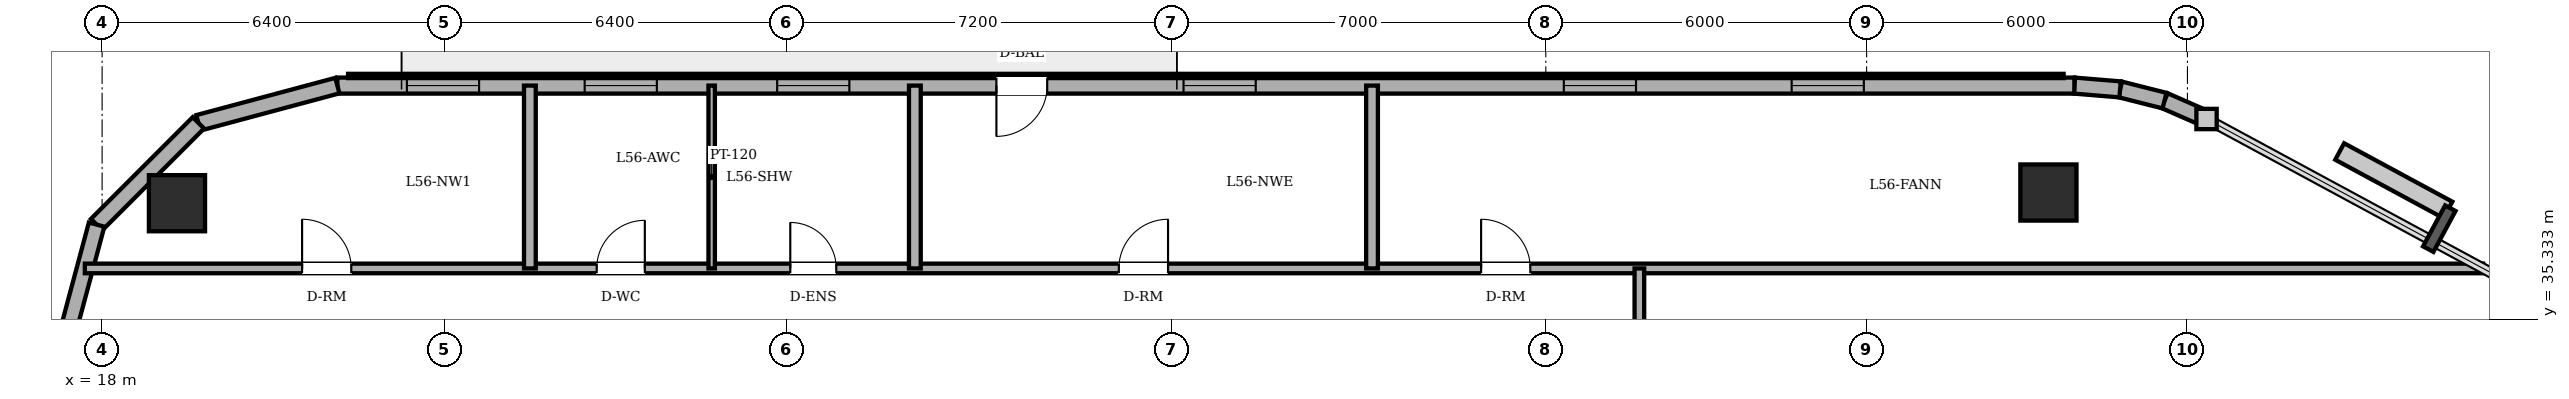
"""IFC4 building model, lengths in metres.
Left out: names, types, materials, properties, quantities, classifications, styles, units other than length and angle.
Written with IfcOpenShell. Run it as: python <this file> out.ifc"""

import sys

from ifc_helpers import new_model, si_unit, direction, frame, frame_2d, origin, origin_2d, place, context, subcontext, project, spatial, rectangle, circle, extrude, element, fill, save


model = new_model("IFC4")
c1 = context("Model", 3, precision=1e-05, world=origin(), true_north=direction((0.0, 1.0)))
c2 = subcontext(c1, "Body", "Model", "MODEL_VIEW")
j1 = project(units=[si_unit("LENGTHUNIT", "METRE"), si_unit("PLANEANGLEUNIT", "RADIAN")], contexts=[c1])
p1 = place(None, origin())
s1 = spatial("IfcSite", under=j1, at=p1, CompositionType="ELEMENT")
p2 = place(p1, origin())
s2 = spatial("IfcBuilding", under=s1, at=p2, CompositionType="ELEMENT")
p3 = place(p2, frame((0.0, 0.0, 215.7)))
s3 = spatial("IfcBuildingStorey", under=s2, at=p3, CompositionType="ELEMENT", Elevation=215.7)
for number, where, z_axis, x_axis in (
    (1, (54.4, 37.7, 0.0), (0.0, 0.0, 1.0), (1.0, 0.0, 0.0)),
    (2, (19.4, 37.5, 0.0), (0.0, 0.0, 1.0), (1.0, 0.0, 0.0)),
):
    element("IfcColumn", number, at=place(p3, frame(where, z_axis=z_axis, x_axis=x_axis)), inside=s3, PredefinedType="COLUMN", context=c2, shape_type="SweptSolid", body=[
        extrude(circle(Radius=0.525, at=origin_2d()), origin(), (0.0, 0.0, 1.0), 3.6),
    ])
p4 = place(p3, frame((57.357, 39.075, 0.0), z_axis=(0.0, 0.0, 1.0), x_axis=(-0.916085473636, 0.400983048261, 0.0)))
e3 = element("IfcWall", 3, at=p4, inside=s3, PredefinedType="SOLIDWALL", context=c2, shape_type="SweptSolid", body=[
    extrude(rectangle(XDim=0.858, YDim=0.3, at=frame_2d((0.429, 0.0))), origin(), (0.0, 0.0, 1.0), 3.4),
])
p5 = place(p3, frame((56.571, 39.419, 0.0), z_axis=(0.0, 0.0, 1.0), x_axis=(-0.969536346338, 0.244947490555, 0.0)))
e4 = element("IfcWall", 4, at=p5, inside=s3, PredefinedType="SOLIDWALL", context=c2, shape_type="SweptSolid", body=[
    extrude(rectangle(XDim=0.857, YDim=0.3, at=frame_2d((0.429, 0.0))), origin(), (0.0, 0.0, 1.0), 3.4),
])
p6 = place(p3, frame((55.74, 39.629, 0.0), z_axis=(0.0, 0.0, 1.0), x_axis=(-0.996565355958, 0.082809971041, 0.0)))
e5 = element("IfcWall", 5, at=p6, inside=s3, PredefinedType="SOLIDWALL", context=c2, shape_type="SweptSolid", body=[
    extrude(rectangle(XDim=0.858, YDim=0.3, at=frame_2d((0.429, 0.0))), origin(), (0.0, 0.0, 1.0), 3.4),
])
p7 = place(p3, frame((54.885, 39.7, 0.0), z_axis=(0.0, 0.0, 1.0), x_axis=(-1.0, 0.0, 0.0)))
e6 = element("IfcWall", 6, at=p7, inside=s3, PredefinedType="SOLIDWALL", context=c2, shape_type="SweptSolid", body=[
    extrude(rectangle(XDim=32.485, YDim=0.3, at=frame_2d((16.243, 0.0))), origin(), (0.0, 0.0, 1.0), 3.4),
])
p8 = place(p7, frame((19.21, 0.0, 0.0)))
e7 = element("IfcOpeningElement", 7, at=p8, cuts=e6, PredefinedType="OPENING", context=c2, shape_type="SweptSolid", body=[
    extrude(rectangle(XDim=0.95, YDim=2.2, at=frame_2d((0.475, 1.1))), frame((0.0, 0.16, 0.0), z_axis=(0.0, -1.0, 0.0), x_axis=(1.0, 0.0, 0.0)), (0.0, 0.0, 1.0), 0.32),
])
p9 = place(p7, frame((3.937, 0.0, 0.85)))
e8 = element("IfcOpeningElement", 8, at=p9, cuts=e6, PredefinedType="OPENING", context=c2, shape_type="SweptSolid", body=[
    extrude(rectangle(XDim=1.35, YDim=1.55, at=frame_2d((0.675, 0.775))), frame((0.0, 0.16, 0.0), z_axis=(0.0, -1.0, 0.0), x_axis=(1.0, 0.0, 0.0)), (0.0, 0.0, 1.0), 0.32),
])
p10 = place(p7, frame((8.198, 0.0, 0.85)))
e9 = element("IfcOpeningElement", 9, at=p10, cuts=e6, PredefinedType="OPENING", context=c2, shape_type="SweptSolid", body=[
    extrude(rectangle(XDim=1.35, YDim=1.55, at=frame_2d((0.675, 0.775))), frame((0.0, 0.16, 0.0), z_axis=(0.0, -1.0, 0.0), x_axis=(1.0, 0.0, 0.0)), (0.0, 0.0, 1.0), 0.32),
])
p11 = place(p7, frame((15.31, 0.0, 0.85)))
e10 = element("IfcOpeningElement", 10, at=p11, cuts=e6, PredefinedType="OPENING", context=c2, shape_type="SweptSolid", body=[
    extrude(rectangle(XDim=1.35, YDim=1.55, at=frame_2d((0.675, 0.775))), frame((0.0, 0.16, 0.0), z_axis=(0.0, -1.0, 0.0), x_axis=(1.0, 0.0, 0.0)), (0.0, 0.0, 1.0), 0.32),
])
p12 = place(p7, frame((22.91, 0.0, 0.85)))
e11 = element("IfcOpeningElement", 11, at=p12, cuts=e6, PredefinedType="OPENING", context=c2, shape_type="SweptSolid", body=[
    extrude(rectangle(XDim=1.35, YDim=1.55, at=frame_2d((0.675, 0.775))), frame((0.0, 0.16, 0.0), z_axis=(0.0, -1.0, 0.0), x_axis=(1.0, 0.0, 0.0)), (0.0, 0.0, 1.0), 0.32),
])
p13 = place(p7, frame((26.51, 0.0, 0.85)))
e12 = element("IfcOpeningElement", 12, at=p13, cuts=e6, PredefinedType="OPENING", context=c2, shape_type="SweptSolid", body=[
    extrude(rectangle(XDim=1.35, YDim=1.55, at=frame_2d((0.675, 0.775))), frame((0.0, 0.16, 0.0), z_axis=(0.0, -1.0, 0.0), x_axis=(1.0, 0.0, 0.0)), (0.0, 0.0, 1.0), 0.32),
])
p14 = place(p7, frame((29.835, 0.0, 0.85)))
e13 = element("IfcOpeningElement", 13, at=p14, cuts=e6, PredefinedType="OPENING", context=c2, shape_type="SweptSolid", body=[
    extrude(rectangle(XDim=1.35, YDim=1.55, at=frame_2d((0.675, 0.775))), frame((0.0, 0.16, 0.0), z_axis=(0.0, -1.0, 0.0), x_axis=(1.0, 0.0, 0.0)), (0.0, 0.0, 1.0), 0.32),
])
p15 = place(p3, frame((22.4, 39.7, 0.0), z_axis=(0.0, 0.0, 1.0), x_axis=(-0.965889330541, -0.258955210695, 0.0)))
e14 = element("IfcWall", 14, at=p15, inside=s3, PredefinedType="SOLIDWALL", context=c2, shape_type="SweptSolid", body=[
    extrude(rectangle(XDim=2.692, YDim=0.3, at=frame_2d((1.346, 0.0))), origin(), (0.0, 0.0, 1.0), 3.4),
])
p16 = place(p3, frame((19.8, 39.003, 0.0), z_axis=(0.0, 0.0, 1.0), x_axis=(-0.707152139074, -0.70706142039, 0.0)))
e15 = element("IfcWall", 15, at=p16, inside=s3, PredefinedType="SOLIDWALL", context=c2, shape_type="SweptSolid", body=[
    extrude(rectangle(XDim=2.691, YDim=0.3, at=frame_2d((1.346, 0.0))), origin(), (0.0, 0.0, 1.0), 3.4),
])
p17 = place(p3, frame((17.897, 37.1, 0.0), z_axis=(0.0, 0.0, 1.0), x_axis=(-0.258932525951, -0.965895412042, 0.0)))
e16 = element("IfcWall", 16, at=p17, inside=s3, PredefinedType="SOLIDWALL", context=c2, shape_type="SweptSolid", body=[
    extrude(rectangle(XDim=2.692, YDim=0.3, at=frame_2d((1.346, 0.0))), origin(), (0.0, 0.0, 1.0), 3.4),
])
p18 = place(p3, frame((17.677, 36.28, 0.0), z_axis=(0.0, 0.0, 1.0), x_axis=(1.0, 0.0, 0.0)))
e17 = element("IfcWall", 17, at=p18, inside=s3, PredefinedType="PARTITIONING", context=c2, shape_type="SweptSolid", body=[
    extrude(rectangle(XDim=44.853, YDim=0.18, at=frame_2d((22.427, 0.0))), origin(), (0.0, 0.0, 1.0), 3.4),
])
p19 = place(p18, frame((9.573, 0.0, 0.0)))
e18 = element("IfcOpeningElement", 18, at=p19, cuts=e17, PredefinedType="OPENING", context=c2, shape_type="SweptSolid", body=[
    extrude(rectangle(XDim=0.9, YDim=2.1, at=frame_2d((0.45, 1.05))), frame((0.0, 0.1, 0.0), z_axis=(0.0, -1.0, 0.0), x_axis=(1.0, 0.0, 0.0)), (0.0, 0.0, 1.0), 0.2),
])
p20 = place(p18, frame((13.193, 0.0, 0.0)))
e19 = element("IfcOpeningElement", 19, at=p20, cuts=e17, PredefinedType="OPENING", context=c2, shape_type="SweptSolid", body=[
    extrude(rectangle(XDim=0.86, YDim=2.1, at=frame_2d((0.43, 1.05))), frame((0.0, 0.1, 0.0), z_axis=(0.0, -1.0, 0.0), x_axis=(1.0, 0.0, 0.0)), (0.0, 0.0, 1.0), 0.2),
])
p21 = place(p18, frame((26.113, 0.0, 0.0)))
e20 = element("IfcOpeningElement", 20, at=p21, cuts=e17, PredefinedType="OPENING", context=c2, shape_type="SweptSolid", body=[
    extrude(rectangle(XDim=0.92, YDim=2.1, at=frame_2d((0.46, 1.05))), frame((0.0, 0.1, 0.0), z_axis=(0.0, -1.0, 0.0), x_axis=(1.0, 0.0, 0.0)), (0.0, 0.0, 1.0), 0.2),
])
p22 = place(p18, frame((4.063, 0.0, 0.0)))
e21 = element("IfcOpeningElement", 21, at=p22, cuts=e17, PredefinedType="OPENING", context=c2, shape_type="SweptSolid", body=[
    extrude(rectangle(XDim=0.92, YDim=2.1, at=frame_2d((0.46, 1.05))), frame((0.0, 0.1, 0.0), z_axis=(0.0, -1.0, 0.0), x_axis=(1.0, 0.0, 0.0)), (0.0, 0.0, 1.0), 0.2),
])
p23 = place(p18, frame((19.338, 0.0, 0.0)))
e22 = element("IfcOpeningElement", 22, at=p23, cuts=e17, PredefinedType="OPENING", context=c2, shape_type="SweptSolid", body=[
    extrude(rectangle(XDim=0.92, YDim=2.1, at=frame_2d((0.46, 1.05))), frame((0.0, 0.1, 0.0), z_axis=(0.0, -1.0, 0.0), x_axis=(1.0, 0.0, 0.0)), (0.0, 0.0, 1.0), 0.2),
])
p24 = place(p3, frame((26.0, 36.28, 0.0), z_axis=(0.0, 0.0, 1.0), x_axis=(0.0, 1.0, 0.0)))
e23 = element("IfcWall", 23, at=p24, inside=s3, PredefinedType="PARTITIONING", context=c2, shape_type="SweptSolid", body=[
    extrude(rectangle(XDim=3.42, YDim=0.22, at=frame_2d((1.71, 0.0))), origin(), (0.0, 0.0, 1.0), 3.4),
])
p25 = place(p3, frame((29.4, 36.28, 0.0), z_axis=(0.0, 0.0, 1.0), x_axis=(0.0, 1.0, 0.0)))
e24 = element("IfcWall", 24, at=p25, inside=s3, PredefinedType="PARTITIONING", context=c2, shape_type="SweptSolid", body=[
    extrude(rectangle(XDim=3.42, YDim=0.12, at=frame_2d((1.71, 0.0))), origin(), (0.0, 0.0, 1.0), 3.4),
])
for number, where, z_axis, x_axis in (
    (25, (33.2, 36.28, 0.0), (0.0, 0.0, 1.0), (0.0, 1.0, 0.0)),
    (26, (41.75, 36.28, 0.0), (0.0, 0.0, 1.0), (0.0, 1.0, 0.0)),
):
    element("IfcWall", number, at=place(p3, frame(where, z_axis=z_axis, x_axis=x_axis)), inside=s3, PredefinedType="PARTITIONING", context=c2, shape_type="SweptSolid", body=[
        extrude(rectangle(XDim=3.42, YDim=0.22, at=frame_2d((1.71, 0.0))), origin(), (0.0, 0.0, 1.0), 3.4),
    ])
p26 = place(p3, frame((46.75, 33.82, 0.0), z_axis=(0.0, 0.0, 1.0), x_axis=(0.0, 1.0, 0.0)))
e27 = element("IfcWall", 27, at=p26, inside=s3, PredefinedType="PARTITIONING", context=c2, shape_type="SweptSolid", body=[
    extrude(rectangle(XDim=2.46, YDim=0.18, at=frame_2d((1.23, 0.0))), origin(), (0.0, 0.0, 1.0), 3.4),
])
p27 = place(p8, origin())
e28 = element("IfcDoor", 28, at=p27, inside=s3, OperationType="SINGLE_SWING_RIGHT", PredefinedType="DOOR", context=c2, shape_type="SweptSolid", body=[
    extrude(rectangle(XDim=0.95, YDim=2.2, at=frame_2d((0.475, 1.1))), frame((0.0, 0.025, 0.0), z_axis=(0.0, -1.0, 0.0), x_axis=(1.0, 0.0, 0.0)), (0.0, 0.0, 1.0), 0.05),
])
fill(e7, e28)
p28 = place(p9, origin())
e29 = element("IfcWindow", 29, at=p28, inside=s3, PartitioningType="SINGLE_PANEL", PredefinedType="WINDOW", context=c2, shape_type="SweptSolid", body=[
    extrude(rectangle(XDim=1.35, YDim=1.55, at=frame_2d((0.675, 0.775))), frame((0.0, 0.03, 0.0), z_axis=(0.0, -1.0, 0.0), x_axis=(1.0, 0.0, 0.0)), (0.0, 0.0, 1.0), 0.06),
])
fill(e8, e29)
p29 = place(p10, origin())
e30 = element("IfcWindow", 30, at=p29, inside=s3, PartitioningType="SINGLE_PANEL", PredefinedType="WINDOW", context=c2, shape_type="SweptSolid", body=[
    extrude(rectangle(XDim=1.35, YDim=1.55, at=frame_2d((0.675, 0.775))), frame((0.0, 0.03, 0.0), z_axis=(0.0, -1.0, 0.0), x_axis=(1.0, 0.0, 0.0)), (0.0, 0.0, 1.0), 0.06),
])
fill(e9, e30)
p30 = place(p11, origin())
e31 = element("IfcWindow", 31, at=p30, inside=s3, PartitioningType="SINGLE_PANEL", PredefinedType="WINDOW", context=c2, shape_type="SweptSolid", body=[
    extrude(rectangle(XDim=1.35, YDim=1.55, at=frame_2d((0.675, 0.775))), frame((0.0, 0.03, 0.0), z_axis=(0.0, -1.0, 0.0), x_axis=(1.0, 0.0, 0.0)), (0.0, 0.0, 1.0), 0.06),
])
fill(e10, e31)
p31 = place(p12, origin())
e32 = element("IfcWindow", 32, at=p31, inside=s3, PartitioningType="SINGLE_PANEL", PredefinedType="WINDOW", context=c2, shape_type="SweptSolid", body=[
    extrude(rectangle(XDim=1.35, YDim=1.55, at=frame_2d((0.675, 0.775))), frame((0.0, 0.03, 0.0), z_axis=(0.0, -1.0, 0.0), x_axis=(1.0, 0.0, 0.0)), (0.0, 0.0, 1.0), 0.06),
])
fill(e11, e32)
p32 = place(p13, origin())
e33 = element("IfcWindow", 33, at=p32, inside=s3, PartitioningType="SINGLE_PANEL", PredefinedType="WINDOW", context=c2, shape_type="SweptSolid", body=[
    extrude(rectangle(XDim=1.35, YDim=1.55, at=frame_2d((0.675, 0.775))), frame((0.0, 0.03, 0.0), z_axis=(0.0, -1.0, 0.0), x_axis=(1.0, 0.0, 0.0)), (0.0, 0.0, 1.0), 0.06),
])
fill(e12, e33)
p33 = place(p14, origin())
e34 = element("IfcWindow", 34, at=p33, inside=s3, PartitioningType="SINGLE_PANEL", PredefinedType="WINDOW", context=c2, shape_type="SweptSolid", body=[
    extrude(rectangle(XDim=1.35, YDim=1.55, at=frame_2d((0.675, 0.775))), frame((0.0, 0.03, 0.0), z_axis=(0.0, -1.0, 0.0), x_axis=(1.0, 0.0, 0.0)), (0.0, 0.0, 1.0), 0.06),
])
fill(e13, e34)
p34 = place(p19, origin())
e35 = element("IfcDoor", 35, at=p34, inside=s3, OperationType="SINGLE_SWING_RIGHT", PredefinedType="DOOR", context=c2, shape_type="SweptSolid", body=[
    extrude(rectangle(XDim=0.9, YDim=2.1, at=frame_2d((0.45, 1.05))), frame((0.0, 0.025, 0.0), z_axis=(0.0, -1.0, 0.0), x_axis=(1.0, 0.0, 0.0)), (0.0, 0.0, 1.0), 0.05),
])
fill(e18, e35)
p35 = place(p20, origin())
e36 = element("IfcDoor", 36, at=p35, inside=s3, OperationType="SINGLE_SWING_LEFT", PredefinedType="DOOR", context=c2, shape_type="SweptSolid", body=[
    extrude(rectangle(XDim=0.86, YDim=2.1, at=frame_2d((0.43, 1.05))), frame((0.0, 0.025, 0.0), z_axis=(0.0, -1.0, 0.0), x_axis=(1.0, 0.0, 0.0)), (0.0, 0.0, 1.0), 0.05),
])
fill(e19, e36)
p36 = place(p21, origin())
e37 = element("IfcDoor", 37, at=p36, inside=s3, OperationType="SINGLE_SWING_LEFT", PredefinedType="DOOR", context=c2, shape_type="SweptSolid", body=[
    extrude(rectangle(XDim=0.92, YDim=2.1, at=frame_2d((0.46, 1.05))), frame((0.0, 0.025, 0.0), z_axis=(0.0, -1.0, 0.0), x_axis=(1.0, 0.0, 0.0)), (0.0, 0.0, 1.0), 0.05),
])
fill(e20, e37)
p37 = place(p22, origin())
e38 = element("IfcDoor", 38, at=p37, inside=s3, OperationType="SINGLE_SWING_LEFT", PredefinedType="DOOR", context=c2, shape_type="SweptSolid", body=[
    extrude(rectangle(XDim=0.92, YDim=2.1, at=frame_2d((0.46, 1.05))), frame((0.0, 0.025, 0.0), z_axis=(0.0, -1.0, 0.0), x_axis=(1.0, 0.0, 0.0)), (0.0, 0.0, 1.0), 0.05),
])
fill(e21, e38)
p38 = place(p23, origin())
e39 = element("IfcDoor", 39, at=p38, inside=s3, OperationType="SINGLE_SWING_RIGHT", PredefinedType="DOOR", context=c2, shape_type="SweptSolid", body=[
    extrude(rectangle(XDim=0.92, YDim=2.1, at=frame_2d((0.46, 1.05))), frame((0.0, 0.025, 0.0), z_axis=(0.0, -1.0, 0.0), x_axis=(1.0, 0.0, 0.0)), (0.0, 0.0, 1.0), 0.05),
])
fill(e22, e39)
save(model, sys.argv[1])
